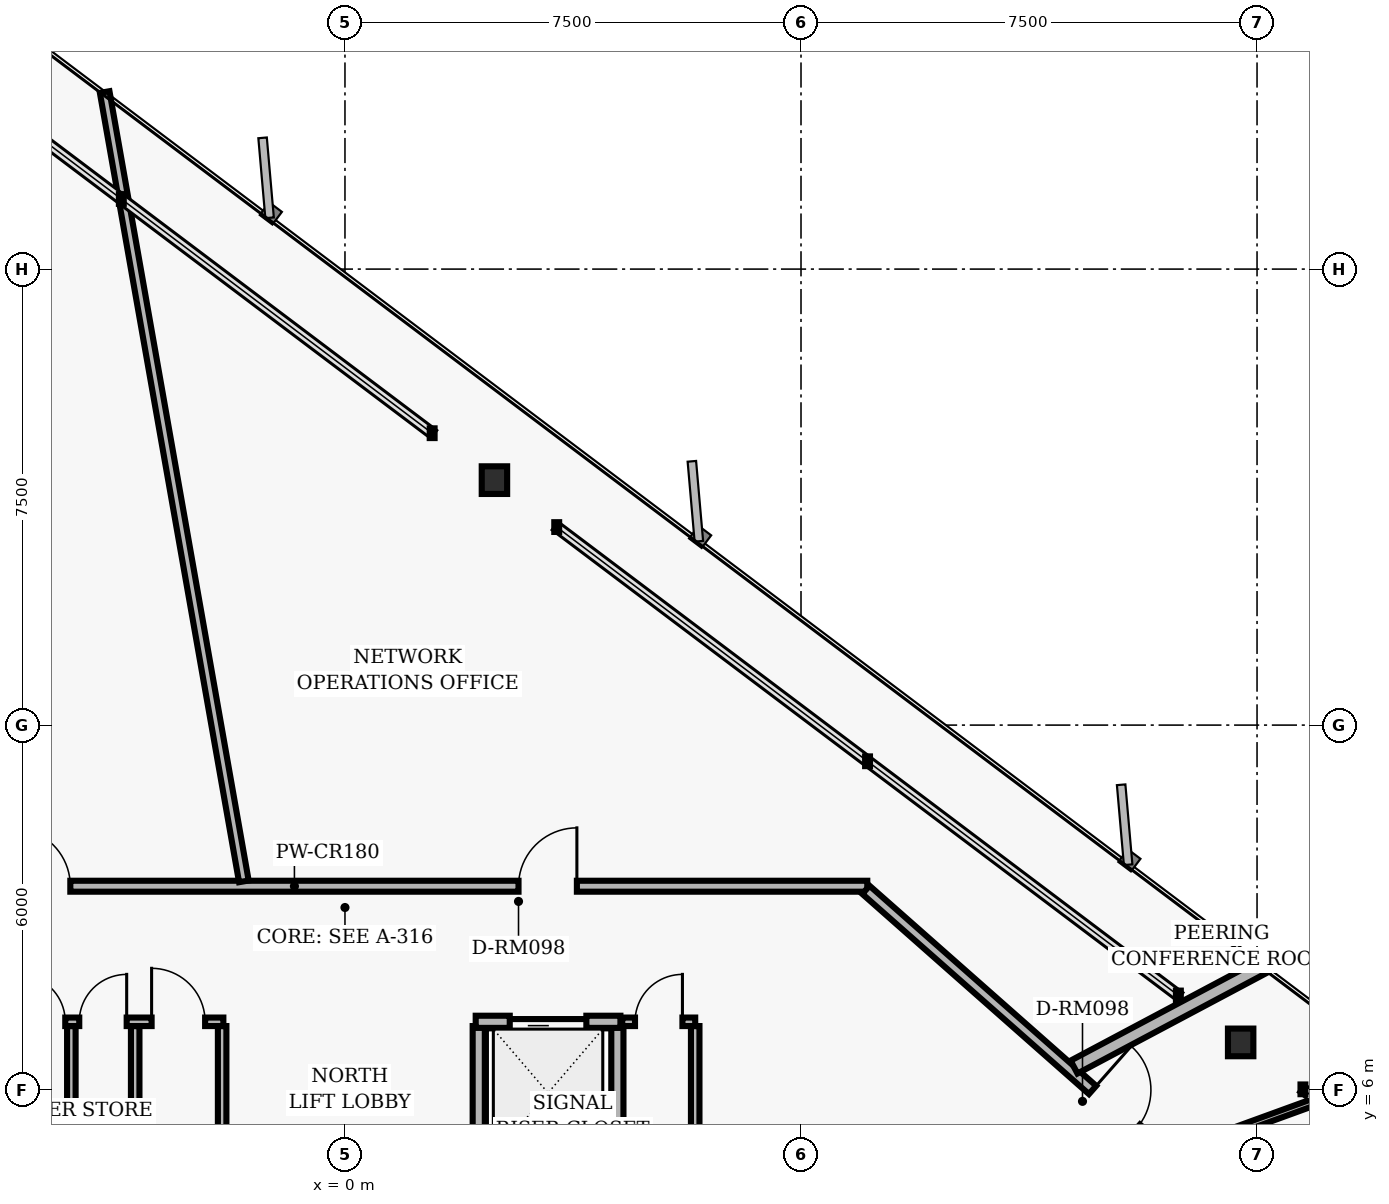
"""IFC4 building model, lengths in metres.
Left out: names, types, materials, properties, quantities, classifications, styles, units other than length and angle.
Written with IfcOpenShell. Run it as: python <this file> out.ifc"""

import sys

from ifc_helpers import new_model, si_unit, direction, frame, frame_2d, origin, origin_2d, place, context, subcontext, project, spatial, rectangle, i_section, extrude, element, fill, save


model = new_model("IFC4")
c1 = context("Model", 3, precision=1e-05, world=origin(), true_north=direction((0.0, 1.0)))
c2 = subcontext(c1, "Body", "Model", "MODEL_VIEW")
j1 = project(units=[si_unit("LENGTHUNIT", "METRE"), si_unit("PLANEANGLEUNIT", "RADIAN")], contexts=[c1])
p1 = place(None, origin())
s1 = spatial("IfcSite", under=j1, at=p1, CompositionType="ELEMENT")
p2 = place(p1, origin())
s2 = spatial("IfcBuilding", under=s1, at=p2, CompositionType="ELEMENT")
p3 = place(p2, frame((0.0, 0.0, 73.12)))
s3 = spatial("IfcBuildingStorey", under=s2, at=p3, CompositionType="ELEMENT", Elevation=73.12)
for number, where, z_axis, x_axis in (
    (1, (14.73, 6.781, 0.0), (0.0, 0.0, 1.0), (1.0, 0.0, 0.0)),
    (2, (2.458, 16.029, 0.0), (0.0, 0.0, 1.0), (1.0, 0.0, 0.0)),
):
    element("IfcColumn", number, at=place(p3, frame(where, z_axis=z_axis, x_axis=x_axis)), inside=s3, PredefinedType="COLUMN", context=c2, shape_type="SweptSolid", body=[
        extrude(i_section(OverallWidth=0.418, OverallDepth=0.455, WebThickness=0.042, FlangeThickness=0.068, FilletRadius=0.025, at=origin_2d()), origin(), (0.0, 0.0, 1.0), 3.36),
    ])
for number, where, z_axis, x_axis in (
    (3, (2.2, 4.95, 0.0), (0.0, 0.0, 1.0), (0.0, 1.0, 0.0)),
    (4, (4.48, 4.95, 0.0), (0.0, 0.0, 1.0), (0.0, 1.0, 0.0)),
):
    element("IfcWall", number, at=place(p3, frame(where, z_axis=z_axis, x_axis=x_axis)), inside=s3, PredefinedType="PARTITIONING", context=c2, shape_type="SweptSolid", body=[
        extrude(rectangle(XDim=2.1, YDim=0.2, at=frame_2d((1.05, 0.0))), origin(), (0.0, 0.0, 1.0), 2.913),
    ])
p4 = place(p3, frame((2.15, 7.12, 0.0), z_axis=(0.0, 0.0, 1.0), x_axis=(1.0, 0.0, 0.0)))
e5 = element("IfcWall", 5, at=p4, inside=s3, PredefinedType="PARTITIONING", context=c2, shape_type="SweptSolid", body=[
    extrude(rectangle(XDim=2.38, YDim=0.2, at=frame_2d((1.19, 0.0))), origin(), (0.0, 0.0, 1.0), 2.427),
])
p5 = place(p4, frame((0.56, 0.0, 0.0)))
e6 = element("IfcOpeningElement", 6, at=p5, cuts=e5, PredefinedType="OPENING", context=c2, shape_type="SweptSolid", body=[
    extrude(rectangle(XDim=1.26, YDim=2.06, at=frame_2d((0.63, 1.03))), frame((0.0, 0.11, 0.0), z_axis=(0.0, -1.0, 0.0), x_axis=(1.0, 0.0, 0.0)), (0.0, 0.0, 1.0), 0.22),
])
for number, where, z_axis, x_axis in (
    (7, (-4.5, 4.95, 0.0), (0.0, 0.0, 1.0), (0.0, 1.0, 0.0)),
    (8, (-3.45, 4.95, 0.0), (0.0, 0.0, 1.0), (0.0, 1.0, 0.0)),
    (9, (-2.02, 4.95, 0.0), (0.0, 0.0, 1.0), (0.0, 1.0, 0.0)),
):
    element("IfcWall", number, at=place(p3, frame(where, z_axis=z_axis, x_axis=x_axis)), inside=s3, PredefinedType="PARTITIONING", context=c2, shape_type="SweptSolid", body=[
        extrude(rectangle(XDim=2.1, YDim=0.14, at=frame_2d((1.05, 0.0))), origin(), (0.0, 0.0, 1.0), 2.913),
    ])
p6 = place(p3, frame((-5.52, 7.12, 0.0), z_axis=(0.0, 0.0, 1.0), x_axis=(1.0, 0.0, 0.0)))
e10 = element("IfcWall", 10, at=p6, inside=s3, PredefinedType="PARTITIONING", context=c2, shape_type="SweptSolid", body=[
    extrude(rectangle(XDim=3.52, YDim=0.14, at=frame_2d((1.76, 0.0))), origin(), (0.0, 0.0, 1.0), 2.913),
])
p7 = place(p6, frame((0.14, 0.0, 0.0)))
e11 = element("IfcOpeningElement", 11, at=p7, cuts=e10, PredefinedType="OPENING", context=c2, shape_type="SweptSolid", body=[
    extrude(rectangle(XDim=0.78, YDim=2.01, at=frame_2d((0.39, 1.005))), frame((0.0, 0.08, 0.0), z_axis=(0.0, -1.0, 0.0), x_axis=(1.0, 0.0, 0.0)), (0.0, 0.0, 1.0), 0.16),
])
p8 = place(p6, frame((1.15, 0.0, 0.0)))
e12 = element("IfcOpeningElement", 12, at=p8, cuts=e10, PredefinedType="OPENING", context=c2, shape_type="SweptSolid", body=[
    extrude(rectangle(XDim=0.78, YDim=2.01, at=frame_2d((0.39, 1.005))), frame((0.0, 0.08, 0.0), z_axis=(0.0, -1.0, 0.0), x_axis=(1.0, 0.0, 0.0)), (0.0, 0.0, 1.0), 0.16),
])
p9 = place(p6, frame((2.34, 0.0, 0.0)))
e13 = element("IfcOpeningElement", 13, at=p9, cuts=e10, PredefinedType="OPENING", context=c2, shape_type="SweptSolid", body=[
    extrude(rectangle(XDim=0.88, YDim=2.02, at=frame_2d((0.44, 1.01))), frame((0.0, 0.08, 0.0), z_axis=(0.0, -1.0, 0.0), x_axis=(1.0, 0.0, 0.0)), (0.0, 0.0, 1.0), 0.16),
])
p10 = place(p3, frame((5.76, 4.95, 0.0), z_axis=(0.0, 0.0, 1.0), x_axis=(0.0, 1.0, 0.0)))
e14 = element("IfcWall", 14, at=p10, inside=s3, PredefinedType="PARTITIONING", context=c2, shape_type="SweptSolid", body=[
    extrude(rectangle(XDim=2.1, YDim=0.14, at=frame_2d((1.05, 0.0))), origin(), (0.0, 0.0, 1.0), 2.913),
])
p11 = place(p3, frame((4.56, 7.12, 0.0), z_axis=(0.0, 0.0, 1.0), x_axis=(1.0, 0.0, 0.0)))
e15 = element("IfcWall", 15, at=p11, inside=s3, PredefinedType="PARTITIONING", context=c2, shape_type="SweptSolid", body=[
    extrude(rectangle(XDim=1.2, YDim=0.14, at=frame_2d((0.6, 0.0))), origin(), (0.0, 0.0, 1.0), 2.427),
])
p12 = place(p11, frame((0.21, 0.0, 0.0)))
e16 = element("IfcOpeningElement", 16, at=p12, cuts=e15, PredefinedType="OPENING", context=c2, shape_type="SweptSolid", body=[
    extrude(rectangle(XDim=0.78, YDim=2.01, at=frame_2d((0.39, 1.005))), frame((0.0, 0.08, 0.0), z_axis=(0.0, -1.0, 0.0), x_axis=(1.0, 0.0, 0.0)), (0.0, 0.0, 1.0), 0.16),
])
p13 = place(p3, frame((-8.59, 9.35, 0.0), z_axis=(0.0, 0.0, 1.0), x_axis=(1.0, 0.0, 0.0)))
e17 = element("IfcWall", 17, at=p13, inside=s3, PredefinedType="PARTITIONING", context=c2, shape_type="SweptSolid", body=[
    extrude(rectangle(XDim=17.18, YDim=0.18, at=frame_2d((8.59, 0.0))), origin(), (0.0, 0.0, 1.0), 2.913),
])
p14 = place(p13, frame((11.444, 0.0, 0.0)))
e18 = element("IfcOpeningElement", 18, at=p14, cuts=e17, PredefinedType="OPENING", context=c2, shape_type="SweptSolid", body=[
    extrude(rectangle(XDim=0.96, YDim=2.02, at=frame_2d((0.48, 1.01))), frame((0.0, 0.1, 0.0), z_axis=(0.0, -1.0, 0.0), x_axis=(1.0, 0.0, 0.0)), (0.0, 0.0, 1.0), 0.2),
])
p15 = place(p13, frame((3.113, 0.0, 0.0)))
e19 = element("IfcOpeningElement", 19, at=p15, cuts=e17, PredefinedType="OPENING", context=c2, shape_type="SweptSolid", body=[
    extrude(rectangle(XDim=0.96, YDim=2.02, at=frame_2d((0.48, 1.01))), frame((0.0, 0.1, 0.0), z_axis=(0.0, -1.0, 0.0), x_axis=(1.0, 0.0, 0.0)), (0.0, 0.0, 1.0), 0.2),
])
p16 = place(p3, frame((8.567, 9.29, 0.0), z_axis=(0.0, 0.0, 1.0), x_axis=(0.749626463267, -0.66186113768, 0.0)))
e20 = element("IfcWall", 20, at=p16, inside=s3, PredefinedType="PARTITIONING", context=c2, shape_type="SweptSolid", body=[
    extrude(rectangle(XDim=6.27, YDim=0.18, at=frame_2d((3.135, 0.0))), origin(), (0.0, 0.0, 1.0), 2.427),
])
p17 = place(p16, frame((4.972, 0.0, 0.0)))
e21 = element("IfcOpeningElement", 21, at=p17, cuts=e20, PredefinedType="OPENING", context=c2, shape_type="SweptSolid", body=[
    extrude(rectangle(XDim=0.96, YDim=2.02, at=frame_2d((0.48, 1.01))), frame((0.0, 0.1, 0.0), z_axis=(0.0, -1.0, 0.0), x_axis=(1.0, 0.0, 0.0)), (0.0, 0.0, 1.0), 0.2),
])
p18 = place(p3, frame((13.28, 4.833, 0.0), z_axis=(0.0, 0.0, 1.0), x_axis=(0.939689084441, 0.342029859198, 0.0)))
e22 = element("IfcWall", 22, at=p18, inside=s3, PredefinedType="MOVABLE", context=c2, shape_type="SweptSolid", body=[
    extrude(rectangle(XDim=4.374, YDim=0.115, at=frame_2d((2.187, 0.0))), origin(), (0.0, 0.0, 1.0), 2.913),
])
p19 = place(p3, frame((11.99, 6.375, 0.0), z_axis=(0.0, 0.0, 1.0), x_axis=(0.882950733712, 0.469465655654, 0.0)))
e23 = element("IfcWall", 23, at=p19, inside=s3, PredefinedType="PARTITIONING", context=c2, shape_type="SweptSolid", body=[
    extrude(rectangle(XDim=3.546, YDim=0.24, at=frame_2d((1.773, 0.0))), origin(), (0.0, 0.0, 1.0), 2.913),
])
p20 = place(p3, frame((-1.663, 9.43, 0.0), z_axis=(0.0, 0.0, 1.0), x_axis=(-0.17364798238, 0.984807787446, 0.0)))
e24 = element("IfcWall", 24, at=p20, inside=s3, PredefinedType="PARTITIONING", context=c2, shape_type="SweptSolid", body=[
    extrude(rectangle(XDim=13.182, YDim=0.16, at=frame_2d((6.591, 0.0))), origin(), (0.0, 0.0, 1.0), 2.913),
])
p21 = place(p5, origin())
e25 = element("IfcDoor", 25, at=p21, inside=s3, OperationType="SLIDING_TO_LEFT", PredefinedType="DOOR", context=c2, shape_type="SweptSolid", body=[
    extrude(rectangle(XDim=1.26, YDim=2.06, at=frame_2d((0.63, 1.03))), frame((0.0, 0.025, 0.0), z_axis=(0.0, -1.0, 0.0), x_axis=(1.0, 0.0, 0.0)), (0.0, 0.0, 1.0), 0.05),
])
fill(e6, e25)
p22 = place(p7, origin())
e26 = element("IfcDoor", 26, at=p22, inside=s3, OperationType="SINGLE_SWING_LEFT", PredefinedType="DOOR", context=c2, shape_type="SweptSolid", body=[
    extrude(rectangle(XDim=0.78, YDim=2.01, at=frame_2d((0.39, 1.005))), frame((0.0, 0.025, 0.0), z_axis=(0.0, -1.0, 0.0), x_axis=(1.0, 0.0, 0.0)), (0.0, 0.0, 1.0), 0.05),
])
fill(e11, e26)
p23 = place(p8, origin())
e27 = element("IfcDoor", 27, at=p23, inside=s3, OperationType="SINGLE_SWING_RIGHT", PredefinedType="DOOR", context=c2, shape_type="SweptSolid", body=[
    extrude(rectangle(XDim=0.78, YDim=2.01, at=frame_2d((0.39, 1.005))), frame((0.0, 0.025, 0.0), z_axis=(0.0, -1.0, 0.0), x_axis=(1.0, 0.0, 0.0)), (0.0, 0.0, 1.0), 0.05),
])
fill(e12, e27)
p24 = place(p9, origin())
e28 = element("IfcDoor", 28, at=p24, inside=s3, OperationType="SINGLE_SWING_LEFT", PredefinedType="DOOR", context=c2, shape_type="SweptSolid", body=[
    extrude(rectangle(XDim=0.88, YDim=2.02, at=frame_2d((0.44, 1.01))), frame((0.0, 0.025, 0.0), z_axis=(0.0, -1.0, 0.0), x_axis=(1.0, 0.0, 0.0)), (0.0, 0.0, 1.0), 0.05),
])
fill(e13, e28)
p25 = place(p12, origin())
e29 = element("IfcDoor", 29, at=p25, inside=s3, OperationType="SINGLE_SWING_RIGHT", PredefinedType="DOOR", context=c2, shape_type="SweptSolid", body=[
    extrude(rectangle(XDim=0.78, YDim=2.01, at=frame_2d((0.39, 1.005))), frame((0.0, 0.025, 0.0), z_axis=(0.0, -1.0, 0.0), x_axis=(1.0, 0.0, 0.0)), (0.0, 0.0, 1.0), 0.05),
])
fill(e16, e29)
p26 = place(p17, origin())
e30 = element("IfcDoor", 30, at=p26, inside=s3, OperationType="SINGLE_SWING_LEFT", PredefinedType="DOOR", context=c2, shape_type="SweptSolid", body=[
    extrude(rectangle(XDim=0.96, YDim=2.02, at=frame_2d((0.48, 1.01))), frame((0.0, 0.025, 0.0), z_axis=(0.0, -1.0, 0.0), x_axis=(1.0, 0.0, 0.0)), (0.0, 0.0, 1.0), 0.05),
])
fill(e21, e30)
p27 = place(p14, origin())
e31 = element("IfcDoor", 31, at=p27, inside=s3, OperationType="SINGLE_SWING_RIGHT", PredefinedType="DOOR", context=c2, shape_type="SweptSolid", body=[
    extrude(rectangle(XDim=0.96, YDim=2.02, at=frame_2d((0.48, 1.01))), frame((0.0, 0.025, 0.0), z_axis=(0.0, -1.0, 0.0), x_axis=(1.0, 0.0, 0.0)), (0.0, 0.0, 1.0), 0.05),
])
fill(e18, e31)
p28 = place(p15, origin())
e32 = element("IfcDoor", 32, at=p28, inside=s3, OperationType="SINGLE_SWING_LEFT", PredefinedType="DOOR", context=c2, shape_type="SweptSolid", body=[
    extrude(rectangle(XDim=0.96, YDim=2.02, at=frame_2d((0.48, 1.01))), frame((0.0, 0.025, 0.0), z_axis=(0.0, -1.0, 0.0), x_axis=(1.0, 0.0, 0.0)), (0.0, 0.0, 1.0), 0.05),
])
fill(e19, e32)
save(model, sys.argv[1])
